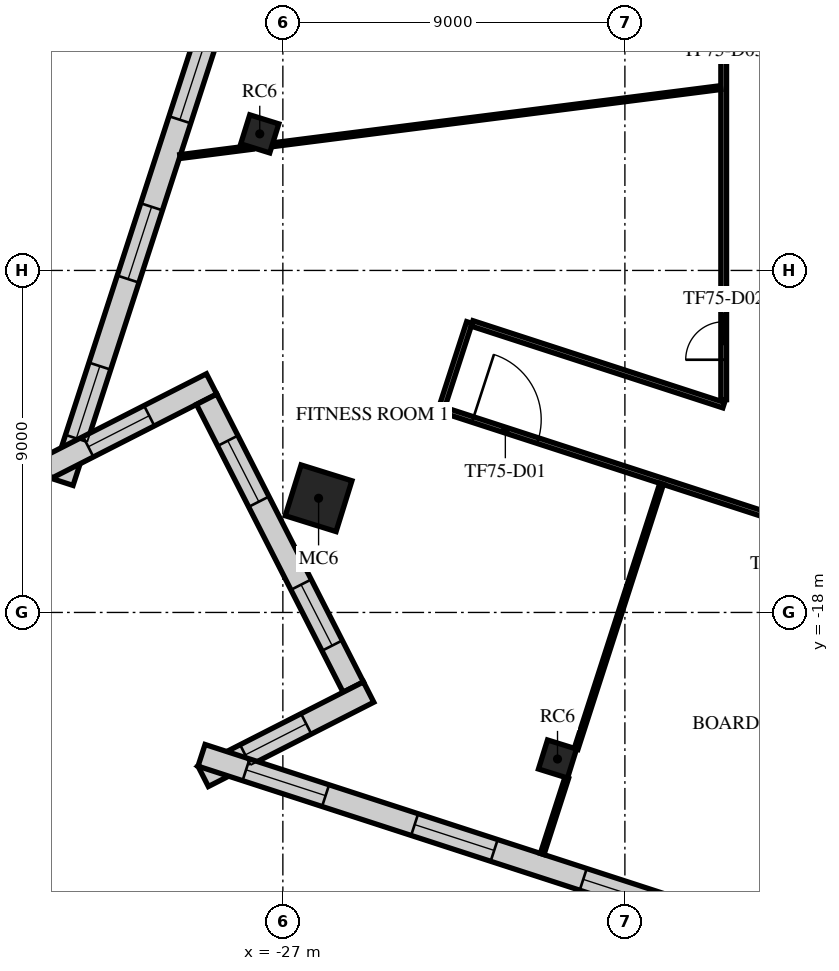
"""IFC4 building model, lengths in metres.
Left out: names, types, materials, properties, quantities, classifications, styles, units other than length and angle.
Written with IfcOpenShell. Run it as: python <this file> out.ifc"""

import sys

from ifc_helpers import new_model, si_unit, direction, frame, frame_2d, origin, origin_2d, place, context, subcontext, project, spatial, rectangle, extrude, element, fill, save


model = new_model("IFC4")
c1 = context("Model", 3, precision=1e-05, world=origin(), true_north=direction((0.0, 1.0)))
c2 = subcontext(c1, "Body", "Model", "MODEL_VIEW")
j1 = project(units=[si_unit("LENGTHUNIT", "METRE"), si_unit("PLANEANGLEUNIT", "RADIAN")], contexts=[c1])
p1 = place(None, origin())
s1 = spatial("IfcSite", under=j1, at=p1, CompositionType="ELEMENT")
p2 = place(p1, origin())
s2 = spatial("IfcBuilding", under=s1, at=p2, CompositionType="ELEMENT")
p3 = place(p2, frame((0.0, 0.0, 316.5)))
s3 = spatial("IfcBuildingStorey", under=s2, at=p3, CompositionType="ELEMENT", Elevation=316.5)
p4 = place(p3, frame((-27.608, -5.406, 0.0), z_axis=(0.0, 0.0, 1.0), x_axis=(0.297503182032, 0.954720826567, 0.0)))
e1 = element("IfcColumn", 1, at=p4, inside=s3, PredefinedType="COLUMN", context=c2, shape_type="SweptSolid", body=[
    extrude(rectangle(XDim=0.8, YDim=0.8, at=origin_2d()), origin(), (0.0, 0.0, 1.0), 4.0),
])
p5 = place(p3, frame((-26.06, -14.995, 0.0), z_axis=(0.0, 0.0, 1.0), x_axis=(0.297503182032, 0.954720826567, 0.0)))
e2 = element("IfcColumn", 2, at=p5, inside=s3, PredefinedType="COLUMN", context=c2, shape_type="SweptSolid", body=[
    extrude(rectangle(XDim=1.4, YDim=1.4, at=origin_2d()), origin(), (0.0, 0.0, 1.0), 4.0),
])
p6 = place(p3, frame((-19.773, -21.857, 0.0), z_axis=(0.0, 0.0, 1.0), x_axis=(0.297503182032, 0.954720826567, 0.0)))
e3 = element("IfcColumn", 3, at=p6, inside=s3, PredefinedType="COLUMN", context=c2, shape_type="SweptSolid", body=[
    extrude(rectangle(XDim=0.8, YDim=0.8, at=origin_2d()), origin(), (0.0, 0.0, 1.0), 4.0),
])
p7 = place(p3, frame((-17.822, 31.552, 0.0), z_axis=(0.0, 0.0, 1.0), x_axis=(-0.309018218247, -0.951056118634, 0.0)))
e4 = element("IfcWall", 4, at=p7, inside=s3, PredefinedType="STANDARD", context=c2, shape_type="SweptSolid", body=[
    extrude(rectangle(XDim=48.49, YDim=0.6, at=frame_2d((24.245, 0.0))), origin(), (0.0, 0.0, 1.0), 3.65),
])
p8 = place(p7, frame((1.204, 0.0, 0.9)))
e5 = element("IfcOpeningElement", 5, at=p8, cuts=e4, PredefinedType="OPENING", context=c2, shape_type="SweptSolid", body=[
    extrude(rectangle(XDim=2.0, YDim=2.1, at=frame_2d((1.0, 1.05))), frame((0.0, 0.31, 0.0), z_axis=(0.0, -1.0, 0.0), x_axis=(1.0, 0.0, 0.0)), (0.0, 0.0, 1.0), 0.62),
])
p9 = place(p7, frame((5.612, 0.0, 0.9)))
e6 = element("IfcOpeningElement", 6, at=p9, cuts=e4, PredefinedType="OPENING", context=c2, shape_type="SweptSolid", body=[
    extrude(rectangle(XDim=2.0, YDim=2.1, at=frame_2d((1.0, 1.05))), frame((0.0, 0.31, 0.0), z_axis=(0.0, -1.0, 0.0), x_axis=(1.0, 0.0, 0.0)), (0.0, 0.0, 1.0), 0.62),
])
p10 = place(p7, frame((10.021, 0.0, 0.9)))
e7 = element("IfcOpeningElement", 7, at=p10, cuts=e4, PredefinedType="OPENING", context=c2, shape_type="SweptSolid", body=[
    extrude(rectangle(XDim=2.0, YDim=2.1, at=frame_2d((1.0, 1.05))), frame((0.0, 0.31, 0.0), z_axis=(0.0, -1.0, 0.0), x_axis=(1.0, 0.0, 0.0)), (0.0, 0.0, 1.0), 0.62),
])
p11 = place(p7, frame((14.428, 0.0, 0.9)))
e8 = element("IfcOpeningElement", 8, at=p11, cuts=e4, PredefinedType="OPENING", context=c2, shape_type="SweptSolid", body=[
    extrude(rectangle(XDim=2.0, YDim=2.1, at=frame_2d((1.0, 1.05))), frame((0.0, 0.31, 0.0), z_axis=(0.0, -1.0, 0.0), x_axis=(1.0, 0.0, 0.0)), (0.0, 0.0, 1.0), 0.62),
])
p12 = place(p7, frame((18.837, 0.0, 0.9)))
e9 = element("IfcOpeningElement", 9, at=p12, cuts=e4, PredefinedType="OPENING", context=c2, shape_type="SweptSolid", body=[
    extrude(rectangle(XDim=2.0, YDim=2.1, at=frame_2d((1.0, 1.05))), frame((0.0, 0.31, 0.0), z_axis=(0.0, -1.0, 0.0), x_axis=(1.0, 0.0, 0.0)), (0.0, 0.0, 1.0), 0.62),
])
p13 = place(p7, frame((23.245, 0.0, 0.9)))
e10 = element("IfcOpeningElement", 10, at=p13, cuts=e4, PredefinedType="OPENING", context=c2, shape_type="SweptSolid", body=[
    extrude(rectangle(XDim=2.0, YDim=2.1, at=frame_2d((1.0, 1.05))), frame((0.0, 0.31, 0.0), z_axis=(0.0, -1.0, 0.0), x_axis=(1.0, 0.0, 0.0)), (0.0, 0.0, 1.0), 0.62),
])
p14 = place(p7, frame((27.653, 0.0, 0.9)))
e11 = element("IfcOpeningElement", 11, at=p14, cuts=e4, PredefinedType="OPENING", context=c2, shape_type="SweptSolid", body=[
    extrude(rectangle(XDim=2.0, YDim=2.1, at=frame_2d((1.0, 1.05))), frame((0.0, 0.31, 0.0), z_axis=(0.0, -1.0, 0.0), x_axis=(1.0, 0.0, 0.0)), (0.0, 0.0, 1.0), 0.62),
])
p15 = place(p7, frame((32.061, 0.0, 0.9)))
e12 = element("IfcOpeningElement", 12, at=p15, cuts=e4, PredefinedType="OPENING", context=c2, shape_type="SweptSolid", body=[
    extrude(rectangle(XDim=2.0, YDim=2.1, at=frame_2d((1.0, 1.05))), frame((0.0, 0.31, 0.0), z_axis=(0.0, -1.0, 0.0), x_axis=(1.0, 0.0, 0.0)), (0.0, 0.0, 1.0), 0.62),
])
p16 = place(p7, frame((36.469, 0.0, 0.9)))
e13 = element("IfcOpeningElement", 13, at=p16, cuts=e4, PredefinedType="OPENING", context=c2, shape_type="SweptSolid", body=[
    extrude(rectangle(XDim=2.0, YDim=2.1, at=frame_2d((1.0, 1.05))), frame((0.0, 0.31, 0.0), z_axis=(0.0, -1.0, 0.0), x_axis=(1.0, 0.0, 0.0)), (0.0, 0.0, 1.0), 0.62),
])
p17 = place(p7, frame((40.877, 0.0, 0.9)))
e14 = element("IfcOpeningElement", 14, at=p17, cuts=e4, PredefinedType="OPENING", context=c2, shape_type="SweptSolid", body=[
    extrude(rectangle(XDim=2.0, YDim=2.1, at=frame_2d((1.0, 1.05))), frame((0.0, 0.31, 0.0), z_axis=(0.0, -1.0, 0.0), x_axis=(1.0, 0.0, 0.0)), (0.0, 0.0, 1.0), 0.62),
])
p18 = place(p7, frame((45.285, 0.0, 0.9)))
e15 = element("IfcOpeningElement", 15, at=p18, cuts=e4, PredefinedType="OPENING", context=c2, shape_type="SweptSolid", body=[
    extrude(rectangle(XDim=2.0, YDim=2.1, at=frame_2d((1.0, 1.05))), frame((0.0, 0.31, 0.0), z_axis=(0.0, -1.0, 0.0), x_axis=(1.0, 0.0, 0.0)), (0.0, 0.0, 1.0), 0.62),
])
p19 = place(p3, frame((-33.228, -14.205, 0.0), z_axis=(0.0, 0.0, 1.0), x_axis=(0.891013179829, 0.453977437073, 0.0)))
e16 = element("IfcWall", 16, at=p19, inside=s3, PredefinedType="STANDARD", context=c2, shape_type="SweptSolid", body=[
    extrude(rectangle(XDim=4.885, YDim=0.6, at=frame_2d((2.443, 0.0))), origin(), (0.0, 0.0, 1.0), 3.65),
])
p20 = place(p19, frame((1.243, 0.0, 0.9)))
e17 = element("IfcOpeningElement", 17, at=p20, cuts=e16, PredefinedType="OPENING", context=c2, shape_type="SweptSolid", body=[
    extrude(rectangle(XDim=1.8, YDim=2.1, at=frame_2d((0.9, 1.05))), frame((0.0, 0.31, 0.0), z_axis=(0.0, -1.0, 0.0), x_axis=(1.0, 0.0, 0.0)), (0.0, 0.0, 1.0), 0.62),
])
p21 = place(p3, frame((-29.006, -12.39, 0.0), z_axis=(0.0, 0.0, 1.0), x_axis=(0.453979132966, -0.891012315758, 0.0)))
e18 = element("IfcWall", 18, at=p21, inside=s3, PredefinedType="STANDARD", context=c2, shape_type="SweptSolid", body=[
    extrude(rectangle(XDim=8.5, YDim=0.6, at=frame_2d((4.25, 0.0))), origin(), (0.0, 0.0, 1.0), 3.65),
])
p22 = place(p21, frame((1.225, 0.0, 0.9)))
e19 = element("IfcOpeningElement", 19, at=p22, cuts=e18, PredefinedType="OPENING", context=c2, shape_type="SweptSolid", body=[
    extrude(rectangle(XDim=1.8, YDim=2.1, at=frame_2d((0.9, 1.05))), frame((0.0, 0.31, 0.0), z_axis=(0.0, -1.0, 0.0), x_axis=(1.0, 0.0, 0.0)), (0.0, 0.0, 1.0), 0.62),
])
p23 = place(p21, frame((5.475, 0.0, 0.9)))
e20 = element("IfcOpeningElement", 20, at=p23, cuts=e18, PredefinedType="OPENING", context=c2, shape_type="SweptSolid", body=[
    extrude(rectangle(XDim=1.8, YDim=2.1, at=frame_2d((0.9, 1.05))), frame((0.0, 0.31, 0.0), z_axis=(0.0, -1.0, 0.0), x_axis=(1.0, 0.0, 0.0)), (0.0, 0.0, 1.0), 0.62),
])
p24 = place(p3, frame((-24.744, -20.095, 0.0), z_axis=(0.0, 0.0, 1.0), x_axis=(-0.891003264926, -0.453996896346, 0.0)))
e21 = element("IfcWall", 21, at=p24, inside=s3, PredefinedType="STANDARD", context=c2, shape_type="SweptSolid", body=[
    extrude(rectangle(XDim=4.885, YDim=0.6, at=frame_2d((2.443, 0.0))), origin(), (0.0, 0.0, 1.0), 3.65),
])
p25 = place(p24, frame((1.843, 0.0, 0.9)))
e22 = element("IfcOpeningElement", 22, at=p25, cuts=e21, PredefinedType="OPENING", context=c2, shape_type="SweptSolid", body=[
    extrude(rectangle(XDim=1.8, YDim=2.1, at=frame_2d((0.9, 1.05))), frame((0.0, 0.31, 0.0), z_axis=(0.0, -1.0, 0.0), x_axis=(1.0, 0.0, 0.0)), (0.0, 0.0, 1.0), 0.62),
])
p26 = place(p3, frame((-29.14, -21.76, 0.0), z_axis=(0.0, 0.0, 1.0), x_axis=(0.951057273207, -0.309014664831, 0.0)))
e23 = element("IfcWall", 23, at=p26, inside=s3, PredefinedType="STANDARD", context=c2, shape_type="SweptSolid", body=[
    extrude(rectangle(XDim=41.979, YDim=0.6, at=frame_2d((20.99, 0.0))), origin(), (0.0, 0.0, 1.0), 3.65),
])
p27 = place(p26, frame((1.232, 0.0, 0.9)))
e24 = element("IfcOpeningElement", 24, at=p27, cuts=e23, PredefinedType="OPENING", context=c2, shape_type="SweptSolid", body=[
    extrude(rectangle(XDim=2.2, YDim=2.1, at=frame_2d((1.1, 1.05))), frame((0.0, 0.31, 0.0), z_axis=(0.0, -1.0, 0.0), x_axis=(1.0, 0.0, 0.0)), (0.0, 0.0, 1.0), 0.62),
])
p28 = place(p26, frame((5.896, 0.0, 0.9)))
e25 = element("IfcOpeningElement", 25, at=p28, cuts=e23, PredefinedType="OPENING", context=c2, shape_type="SweptSolid", body=[
    extrude(rectangle(XDim=2.2, YDim=2.1, at=frame_2d((1.1, 1.05))), frame((0.0, 0.31, 0.0), z_axis=(0.0, -1.0, 0.0), x_axis=(1.0, 0.0, 0.0)), (0.0, 0.0, 1.0), 0.62),
])
p29 = place(p26, frame((10.561, 0.0, 0.9)))
e26 = element("IfcOpeningElement", 26, at=p29, cuts=e23, PredefinedType="OPENING", context=c2, shape_type="SweptSolid", body=[
    extrude(rectangle(XDim=2.2, YDim=2.1, at=frame_2d((1.1, 1.05))), frame((0.0, 0.31, 0.0), z_axis=(0.0, -1.0, 0.0), x_axis=(1.0, 0.0, 0.0)), (0.0, 0.0, 1.0), 0.62),
])
p30 = place(p26, frame((15.225, 0.0, 0.9)))
e27 = element("IfcOpeningElement", 27, at=p30, cuts=e23, PredefinedType="OPENING", context=c2, shape_type="SweptSolid", body=[
    extrude(rectangle(XDim=2.2, YDim=2.1, at=frame_2d((1.1, 1.05))), frame((0.0, 0.31, 0.0), z_axis=(0.0, -1.0, 0.0), x_axis=(1.0, 0.0, 0.0)), (0.0, 0.0, 1.0), 0.62),
])
p31 = place(p26, frame((19.89, 0.0, 0.9)))
e28 = element("IfcOpeningElement", 28, at=p31, cuts=e23, PredefinedType="OPENING", context=c2, shape_type="SweptSolid", body=[
    extrude(rectangle(XDim=2.2, YDim=2.1, at=frame_2d((1.1, 1.05))), frame((0.0, 0.31, 0.0), z_axis=(0.0, -1.0, 0.0), x_axis=(1.0, 0.0, 0.0)), (0.0, 0.0, 1.0), 0.62),
])
p32 = place(p26, frame((24.554, 0.0, 0.9)))
e29 = element("IfcOpeningElement", 29, at=p32, cuts=e23, PredefinedType="OPENING", context=c2, shape_type="SweptSolid", body=[
    extrude(rectangle(XDim=2.2, YDim=2.1, at=frame_2d((1.1, 1.05))), frame((0.0, 0.31, 0.0), z_axis=(0.0, -1.0, 0.0), x_axis=(1.0, 0.0, 0.0)), (0.0, 0.0, 1.0), 0.62),
])
p33 = place(p26, frame((29.218, 0.0, 0.9)))
e30 = element("IfcOpeningElement", 30, at=p33, cuts=e23, PredefinedType="OPENING", context=c2, shape_type="SweptSolid", body=[
    extrude(rectangle(XDim=2.2, YDim=2.1, at=frame_2d((1.1, 1.05))), frame((0.0, 0.31, 0.0), z_axis=(0.0, -1.0, 0.0), x_axis=(1.0, 0.0, 0.0)), (0.0, 0.0, 1.0), 0.62),
])
p34 = place(p26, frame((33.883, 0.0, 0.9)))
e31 = element("IfcOpeningElement", 31, at=p34, cuts=e23, PredefinedType="OPENING", context=c2, shape_type="SweptSolid", body=[
    extrude(rectangle(XDim=2.2, YDim=2.1, at=frame_2d((1.1, 1.05))), frame((0.0, 0.31, 0.0), z_axis=(0.0, -1.0, 0.0), x_axis=(1.0, 0.0, 0.0)), (0.0, 0.0, 1.0), 0.62),
])
p35 = place(p26, frame((38.547, 0.0, 0.9)))
e32 = element("IfcOpeningElement", 32, at=p35, cuts=e23, PredefinedType="OPENING", context=c2, shape_type="SweptSolid", body=[
    extrude(rectangle(XDim=2.2, YDim=2.1, at=frame_2d((1.1, 1.05))), frame((0.0, 0.31, 0.0), z_axis=(0.0, -1.0, 0.0), x_axis=(1.0, 0.0, 0.0)), (0.0, 0.0, 1.0), 0.62),
])
p36 = place(p3, frame((-22.834, -12.653, 0.0), z_axis=(0.0, 0.0, 1.0), x_axis=(0.309198799084, 0.950997425152, 0.0)))
e33 = element("IfcWall", 33, at=p36, inside=s3, PredefinedType="PARTITIONING", context=c2, shape_type="SweptSolid", body=[
    extrude(rectangle(XDim=2.4, YDim=0.15, at=frame_2d((1.2, 0.0))), origin(), (0.0, 0.0, 1.0), 3.25),
])
p37 = place(p3, frame((-22.763, -12.676, 0.0), z_axis=(0.0, 0.0, 1.0), x_axis=(0.951055018443, -0.309021604252, 0.0)))
e34 = element("IfcWall", 34, at=p37, inside=s3, PredefinedType="PARTITIONING", context=c2, shape_type="SweptSolid", body=[
    extrude(rectangle(XDim=35.537, YDim=0.15, at=frame_2d((17.769, 0.0))), origin(), (0.0, 0.0, 1.0), 3.25),
])
p38 = place(p37, frame((0.8, 0.0, 0.0)))
e35 = element("IfcOpeningElement", 35, at=p38, cuts=e34, PredefinedType="OPENING", context=c2, shape_type="SweptSolid", body=[
    extrude(rectangle(XDim=1.8, YDim=2.1, at=frame_2d((0.9, 1.05))), frame((0.0, 0.085, 0.0), z_axis=(0.0, -1.0, 0.0), x_axis=(1.0, 0.0, 0.0)), (0.0, 0.0, 1.0), 0.17),
])
p39 = place(p37, frame((9.098, 0.0, 0.0)))
e36 = element("IfcOpeningElement", 36, at=p39, cuts=e34, PredefinedType="OPENING", context=c2, shape_type="SweptSolid", body=[
    extrude(rectangle(XDim=1.0, YDim=2.1, at=frame_2d((0.5, 1.05))), frame((0.0, 0.085, 0.0), z_axis=(0.0, -1.0, 0.0), x_axis=(1.0, 0.0, 0.0)), (0.0, 0.0, 1.0), 0.17),
])
p40 = place(p37, frame((17.589, 0.0, 0.0)))
e37 = element("IfcOpeningElement", 37, at=p40, cuts=e34, PredefinedType="OPENING", context=c2, shape_type="SweptSolid", body=[
    extrude(rectangle(XDim=1.0, YDim=2.1, at=frame_2d((0.5, 1.05))), frame((0.0, 0.085, 0.0), z_axis=(0.0, -1.0, 0.0), x_axis=(1.0, 0.0, 0.0)), (0.0, 0.0, 1.0), 0.17),
])
p41 = place(p37, frame((27.473, 0.0, 0.0)))
e38 = element("IfcOpeningElement", 38, at=p41, cuts=e34, PredefinedType="OPENING", context=c2, shape_type="SweptSolid", body=[
    extrude(rectangle(XDim=1.0, YDim=2.1, at=frame_2d((0.5, 1.05))), frame((0.0, 0.085, 0.0), z_axis=(0.0, -1.0, 0.0), x_axis=(1.0, 0.0, 0.0)), (0.0, 0.0, 1.0), 0.17),
])
p42 = place(p37, frame((30.83, 0.0, 0.0)))
e39 = element("IfcOpeningElement", 39, at=p42, cuts=e34, PredefinedType="OPENING", context=c2, shape_type="SweptSolid", body=[
    extrude(rectangle(XDim=1.8, YDim=2.1, at=frame_2d((0.9, 1.05))), frame((0.0, 0.085, 0.0), z_axis=(0.0, -1.0, 0.0), x_axis=(1.0, 0.0, 0.0)), (0.0, 0.0, 1.0), 0.17),
])
p43 = place(p3, frame((-22.021, -10.394, 0.0), z_axis=(0.0, 0.0, 1.0), x_axis=(0.951082252119, -0.308937776427, 0.0)))
e40 = element("IfcWall", 40, at=p43, inside=s3, PredefinedType="PARTITIONING", context=c2, shape_type="SweptSolid", body=[
    extrude(rectangle(XDim=6.961, YDim=0.15, at=frame_2d((3.481, 0.0))), origin(), (0.0, 0.0, 1.0), 3.25),
])
p44 = place(p3, frame((-15.4, -12.4, 0.0), z_axis=(0.0, 0.0, 1.0), x_axis=(0.0, 1.0, 0.0)))
e41 = element("IfcWall", 41, at=p44, inside=s3, PredefinedType="PARTITIONING", context=c2, shape_type="SweptSolid", body=[
    extrude(rectangle(XDim=24.8, YDim=0.15, at=frame_2d((12.4, 0.0))), origin(), (0.0, 0.0, 1.0), 3.25),
])
p45 = place(p44, frame((1.05, 0.0, 0.0)))
e42 = element("IfcOpeningElement", 42, at=p45, cuts=e41, PredefinedType="OPENING", context=c2, shape_type="SweptSolid", body=[
    extrude(rectangle(XDim=1.0, YDim=2.1, at=frame_2d((0.5, 1.05))), frame((0.0, 0.085, 0.0), z_axis=(0.0, -1.0, 0.0), x_axis=(1.0, 0.0, 0.0)), (0.0, 0.0, 1.0), 0.17),
])
p46 = place(p44, frame((9.767, 0.0, 0.0)))
e43 = element("IfcOpeningElement", 43, at=p46, cuts=e41, PredefinedType="OPENING", context=c2, shape_type="SweptSolid", body=[
    extrude(rectangle(XDim=1.0, YDim=2.1, at=frame_2d((0.5, 1.05))), frame((0.0, 0.085, 0.0), z_axis=(0.0, -1.0, 0.0), x_axis=(1.0, 0.0, 0.0)), (0.0, 0.0, 1.0), 0.17),
])
p47 = place(p44, frame((16.733, 0.0, 0.0)))
e44 = element("IfcOpeningElement", 44, at=p47, cuts=e41, PredefinedType="OPENING", context=c2, shape_type="SweptSolid", body=[
    extrude(rectangle(XDim=1.0, YDim=2.1, at=frame_2d((0.5, 1.05))), frame((0.0, 0.085, 0.0), z_axis=(0.0, -1.0, 0.0), x_axis=(1.0, 0.0, 0.0)), (0.0, 0.0, 1.0), 0.17),
])
p48 = place(p3, frame((-29.707, -6.004, 0.0), z_axis=(0.0, 0.0, 1.0), x_axis=(0.991958310613, 0.126565042593, 0.0)))
e45 = element("IfcWall", 45, at=p48, inside=s3, PredefinedType="PARTITIONING", context=c2, shape_type="SweptSolid", body=[
    extrude(rectangle(XDim=1.912, YDim=0.1, at=frame_2d((0.956, 0.0))), origin(), (0.0, 0.0, 1.0), 3.65),
])
p49 = place(p3, frame((-27.279, -5.694, 0.0), z_axis=(0.0, 0.0, 1.0), x_axis=(0.991957239154, 0.126573439907, 0.0)))
e46 = element("IfcWall", 46, at=p49, inside=s3, PredefinedType="PARTITIONING", context=c2, shape_type="SweptSolid", body=[
    extrude(rectangle(XDim=11.893, YDim=0.1, at=frame_2d((5.947, 0.0))), origin(), (0.0, 0.0, 1.0), 3.13),
])
p50 = place(p3, frame((-20.176, -24.355, 0.0), z_axis=(0.0, 0.0, 1.0), x_axis=(0.307097655816, 0.951678007412, 0.0)))
e47 = element("IfcWall", 47, at=p50, inside=s3, PredefinedType="PARTITIONING", context=c2, shape_type="SweptSolid", body=[
    extrude(rectangle(XDim=2.105, YDim=0.1, at=frame_2d((1.053, 0.0))), origin(), (0.0, 0.0, 1.0), 3.65),
])
p51 = place(p3, frame((-19.284, -21.59, 0.0), z_axis=(0.0, 0.0, 1.0), x_axis=(0.307047557854, 0.951694172103, 0.0)))
e48 = element("IfcWall", 48, at=p51, inside=s3, PredefinedType="PARTITIONING", context=c2, shape_type="SweptSolid", body=[
    extrude(rectangle(XDim=7.328, YDim=0.1, at=frame_2d((3.664, 0.0))), origin(), (0.0, 0.0, 1.0), 3.25),
])
p52 = place(p16, origin())
e49 = element("IfcWindow", 49, at=p52, inside=s3, PartitioningType="SINGLE_PANEL", PredefinedType="WINDOW", context=c2, shape_type="SweptSolid", body=[
    extrude(rectangle(XDim=2.0, YDim=2.1, at=frame_2d((1.0, 1.05))), frame((0.0, 0.03, 0.0), z_axis=(0.0, -1.0, 0.0), x_axis=(1.0, 0.0, 0.0)), (0.0, 0.0, 1.0), 0.06),
])
fill(e13, e49)
p53 = place(p17, origin())
e50 = element("IfcWindow", 50, at=p53, inside=s3, PartitioningType="SINGLE_PANEL", PredefinedType="WINDOW", context=c2, shape_type="SweptSolid", body=[
    extrude(rectangle(XDim=2.0, YDim=2.1, at=frame_2d((1.0, 1.05))), frame((0.0, 0.03, 0.0), z_axis=(0.0, -1.0, 0.0), x_axis=(1.0, 0.0, 0.0)), (0.0, 0.0, 1.0), 0.06),
])
fill(e14, e50)
p54 = place(p18, origin())
e51 = element("IfcWindow", 51, at=p54, inside=s3, PartitioningType="SINGLE_PANEL", PredefinedType="WINDOW", context=c2, shape_type="SweptSolid", body=[
    extrude(rectangle(XDim=2.0, YDim=2.1, at=frame_2d((1.0, 1.05))), frame((0.0, 0.03, 0.0), z_axis=(0.0, -1.0, 0.0), x_axis=(1.0, 0.0, 0.0)), (0.0, 0.0, 1.0), 0.06),
])
fill(e15, e51)
p55 = place(p20, origin())
e52 = element("IfcWindow", 52, at=p55, inside=s3, PartitioningType="SINGLE_PANEL", PredefinedType="WINDOW", context=c2, shape_type="SweptSolid", body=[
    extrude(rectangle(XDim=1.8, YDim=2.1, at=frame_2d((0.9, 1.05))), frame((0.0, 0.03, 0.0), z_axis=(0.0, -1.0, 0.0), x_axis=(1.0, 0.0, 0.0)), (0.0, 0.0, 1.0), 0.06),
])
fill(e17, e52)
p56 = place(p22, origin())
e53 = element("IfcWindow", 53, at=p56, inside=s3, PartitioningType="SINGLE_PANEL", PredefinedType="WINDOW", context=c2, shape_type="SweptSolid", body=[
    extrude(rectangle(XDim=1.8, YDim=2.1, at=frame_2d((0.9, 1.05))), frame((0.0, 0.03, 0.0), z_axis=(0.0, -1.0, 0.0), x_axis=(1.0, 0.0, 0.0)), (0.0, 0.0, 1.0), 0.06),
])
fill(e19, e53)
p57 = place(p23, origin())
e54 = element("IfcWindow", 54, at=p57, inside=s3, PartitioningType="SINGLE_PANEL", PredefinedType="WINDOW", context=c2, shape_type="SweptSolid", body=[
    extrude(rectangle(XDim=1.8, YDim=2.1, at=frame_2d((0.9, 1.05))), frame((0.0, 0.03, 0.0), z_axis=(0.0, -1.0, 0.0), x_axis=(1.0, 0.0, 0.0)), (0.0, 0.0, 1.0), 0.06),
])
fill(e20, e54)
p58 = place(p25, origin())
e55 = element("IfcWindow", 55, at=p58, inside=s3, PartitioningType="SINGLE_PANEL", PredefinedType="WINDOW", context=c2, shape_type="SweptSolid", body=[
    extrude(rectangle(XDim=1.8, YDim=2.1, at=frame_2d((0.9, 1.05))), frame((0.0, 0.03, 0.0), z_axis=(0.0, -1.0, 0.0), x_axis=(1.0, 0.0, 0.0)), (0.0, 0.0, 1.0), 0.06),
])
fill(e22, e55)
p59 = place(p27, origin())
e56 = element("IfcWindow", 56, at=p59, inside=s3, PartitioningType="SINGLE_PANEL", PredefinedType="WINDOW", context=c2, shape_type="SweptSolid", body=[
    extrude(rectangle(XDim=2.2, YDim=2.1, at=frame_2d((1.1, 1.05))), frame((0.0, 0.03, 0.0), z_axis=(0.0, -1.0, 0.0), x_axis=(1.0, 0.0, 0.0)), (0.0, 0.0, 1.0), 0.06),
])
fill(e24, e56)
p60 = place(p28, origin())
e57 = element("IfcWindow", 57, at=p60, inside=s3, PartitioningType="SINGLE_PANEL", PredefinedType="WINDOW", context=c2, shape_type="SweptSolid", body=[
    extrude(rectangle(XDim=2.2, YDim=2.1, at=frame_2d((1.1, 1.05))), frame((0.0, 0.03, 0.0), z_axis=(0.0, -1.0, 0.0), x_axis=(1.0, 0.0, 0.0)), (0.0, 0.0, 1.0), 0.06),
])
fill(e25, e57)
p61 = place(p29, origin())
e58 = element("IfcWindow", 58, at=p61, inside=s3, PartitioningType="SINGLE_PANEL", PredefinedType="WINDOW", context=c2, shape_type="SweptSolid", body=[
    extrude(rectangle(XDim=2.2, YDim=2.1, at=frame_2d((1.1, 1.05))), frame((0.0, 0.03, 0.0), z_axis=(0.0, -1.0, 0.0), x_axis=(1.0, 0.0, 0.0)), (0.0, 0.0, 1.0), 0.06),
])
fill(e26, e58)
p62 = place(p38, frame((1.8, 0.0, 0.0), z_axis=(0.0, 0.0, 1.0), x_axis=(-1.0, 0.0, 0.0)))
e59 = element("IfcDoor", 59, at=p62, inside=s3, OperationType="DOUBLE_DOOR_SINGLE_SWING", PredefinedType="DOOR", context=c2, shape_type="SweptSolid", body=[
    extrude(rectangle(XDim=1.8, YDim=2.1, at=frame_2d((0.9, 1.05))), frame((0.0, 0.025, 0.0), z_axis=(0.0, -1.0, 0.0), x_axis=(1.0, 0.0, 0.0)), (0.0, 0.0, 1.0), 0.05),
])
fill(e35, e59)
p63 = place(p45, origin())
e60 = element("IfcDoor", 60, at=p63, inside=s3, OperationType="SINGLE_SWING_LEFT", PredefinedType="DOOR", context=c2, shape_type="SweptSolid", body=[
    extrude(rectangle(XDim=1.0, YDim=2.1, at=frame_2d((0.5, 1.05))), frame((0.0, 0.025, 0.0), z_axis=(0.0, -1.0, 0.0), x_axis=(1.0, 0.0, 0.0)), (0.0, 0.0, 1.0), 0.05),
])
fill(e42, e60)
save(model, sys.argv[1])
